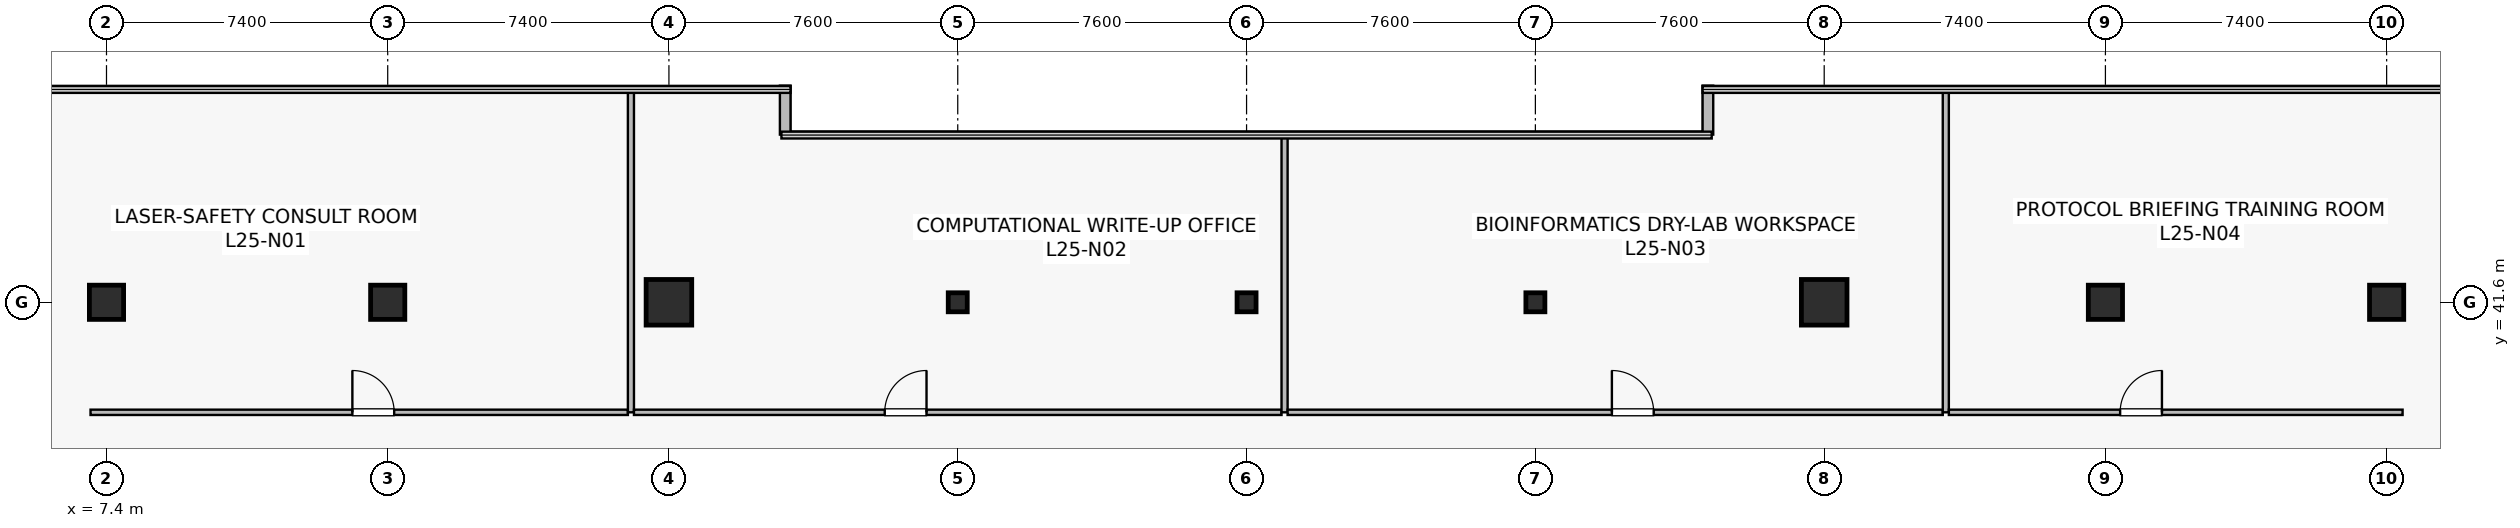
"""IFC4 building model, lengths in metres.
Left out: names, types, materials, properties, quantities, classifications, styles, units other than length and angle.
Written with IfcOpenShell. Run it as: python <this file> out.ifc"""

import sys

from ifc_helpers import new_model, si_unit, direction, frame, frame_2d, origin, origin_2d, place, context, subcontext, project, spatial, rectangle, hollow_rectangle, extrude, source, transform, mapped, element, fill, save


model = new_model("IFC4")
c1 = context("Model", 3, precision=1e-05, world=origin(), true_north=direction((0.0, 1.0)))
c2 = subcontext(c1, "Body", "Model", "MODEL_VIEW")
j1 = project(units=[si_unit("LENGTHUNIT", "METRE"), si_unit("PLANEANGLEUNIT", "RADIAN")], contexts=[c1])
p1 = place(None, origin())
s1 = spatial("IfcSite", under=j1, at=p1, CompositionType="ELEMENT")
p2 = place(p1, origin())
s2 = spatial("IfcBuilding", under=s1, at=p2, CompositionType="ELEMENT")
p3 = place(p2, frame((0.0, 0.0, 105.1)))
s3 = spatial("IfcBuildingStorey", under=s2, at=p3, CompositionType="ELEMENT", Elevation=105.1)
m1 = source(origin(), c2, "Body", "SweptSolid", [
    extrude(rectangle(XDim=0.9, YDim=0.9, at=origin_2d()), origin(), (0.0, 0.0, 1.0), 4.1),
])
p4 = place(p3, frame((14.8, 41.6, 0.0), z_axis=(0.0, 0.0, 1.0), x_axis=(1.0, 0.0, 0.0)))
e1 = element("IfcColumn", 1, at=p4, inside=s3, PredefinedType="COLUMN", context=c2, shape_type="MappedRepresentation", body=[
    mapped(m1, transform((0.0, 0.0, 0.0), scale=1.0)),
])
m2 = source(origin(), c2, "Body", "SweptSolid", [
    extrude(rectangle(XDim=1.2, YDim=1.2, at=origin_2d()), origin(), (0.0, 0.0, 1.0), 4.1),
])
for number, where, z_axis, x_axis in (
    (2, (22.2, 41.6, 0.0), (0.0, 0.0, 1.0), (1.0, 0.0, 0.0)),
    (3, (52.6, 41.6, 0.0), (0.0, 0.0, 1.0), (1.0, 0.0, 0.0)),
):
    element("IfcColumn", number, at=place(p3, frame(where, z_axis=z_axis, x_axis=x_axis)), inside=s3, PredefinedType="COLUMN", context=c2, shape_type="MappedRepresentation", body=[
        mapped(m2, transform((0.0, 0.0, 0.0), scale=1.0)),
    ])
for number, where, z_axis, x_axis in (
    (4, (60.0, 41.6, 0.0), (0.0, 0.0, 1.0), (1.0, 0.0, 0.0)),
    (5, (7.4, 41.6, 0.0), (0.0, 0.0, 1.0), (1.0, 0.0, 0.0)),
    (6, (67.4, 41.6, 0.0), (0.0, 0.0, 1.0), (1.0, 0.0, 0.0)),
):
    element("IfcColumn", number, at=place(p3, frame(where, z_axis=z_axis, x_axis=x_axis)), inside=s3, PredefinedType="COLUMN", context=c2, shape_type="MappedRepresentation", body=[
        mapped(m1, transform((0.0, 0.0, 0.0), scale=1.0)),
    ])
m3 = source(origin(), c2, "Body", "SweptSolid", [
    extrude(hollow_rectangle(XDim=0.5, YDim=0.5, WallThickness=0.022, at=origin_2d()), origin(), (0.0, 0.0, 1.0), 4.1),
])
for number, where, z_axis, x_axis in (
    (7, (29.8, 41.6, 0.0), (0.0, 0.0, 1.0), (1.0, 0.0, 0.0)),
    (8, (37.4, 41.6, 0.0), (0.0, 0.0, 1.0), (1.0, 0.0, 0.0)),
    (9, (45.0, 41.6, 0.0), (0.0, 0.0, 1.0), (1.0, 0.0, 0.0)),
):
    element("IfcColumn", number, at=place(p3, frame(where, z_axis=z_axis, x_axis=x_axis)), inside=s3, PredefinedType="COLUMN", context=c2, shape_type="MappedRepresentation", body=[
        mapped(m3, transform((0.0, 0.0, 0.0), scale=1.0)),
    ])
for number, where, z_axis, x_axis in (
    (10, (49.54, 47.3, 0.0), (0.0, 0.0, 1.0), (0.0, -1.0, 0.0)),
    (11, (25.26, 46.012, 0.0), (0.0, 0.0, 1.0), (0.0, 1.0, 0.0)),
):
    element("IfcWall", number, at=place(p3, frame(where, z_axis=z_axis, x_axis=x_axis)), inside=s3, PredefinedType="STANDARD", context=c2, shape_type="SweptSolid", body=[
        extrude(rectangle(XDim=1.288, YDim=0.28, at=frame_2d((0.644, 0.0))), origin(), (0.0, 0.0, 1.0), 3.79),
    ])
p5 = place(p3, frame((6.98, 38.705, 0.0), z_axis=(0.0, 0.0, 1.0), x_axis=(1.0, 0.0, 0.0)))
e12 = element("IfcWall", 12, at=p5, inside=s3, PredefinedType="PARTITIONING", context=c2, shape_type="SweptSolid", body=[
    extrude(rectangle(XDim=14.14, YDim=0.14, at=frame_2d((7.07, 0.0))), origin(), (0.0, 0.0, 1.0), 3.125),
])
p6 = place(p5, frame((6.89, 0.0, 0.0)))
e13 = element("IfcOpeningElement", 13, at=p6, cuts=e12, PredefinedType="OPENING", context=c2, shape_type="SweptSolid", body=[
    extrude(rectangle(XDim=1.1, YDim=2.18, at=frame_2d((0.55, 1.09))), frame((0.0, 0.08, 0.0), z_axis=(0.0, -1.0, 0.0), x_axis=(1.0, 0.0, 0.0)), (0.0, 0.0, 1.0), 0.16),
])
p7 = place(p3, frame((21.2, 38.705, 0.0), z_axis=(0.0, 0.0, 1.0), x_axis=(0.0, 1.0, 0.0)))
e14 = element("IfcWall", 14, at=p7, inside=s3, PredefinedType="PARTITIONING", context=c2, shape_type="SweptSolid", body=[
    extrude(rectangle(XDim=8.485, YDim=0.16, at=frame_2d((4.242, 0.0))), origin(), (0.0, 0.0, 1.0), 3.075),
])
p8 = place(p3, frame((21.28, 38.705, 0.0), z_axis=(0.0, 0.0, 1.0), x_axis=(1.0, 0.0, 0.0)))
e15 = element("IfcWall", 15, at=p8, inside=s3, PredefinedType="PARTITIONING", context=c2, shape_type="SweptSolid", body=[
    extrude(rectangle(XDim=17.04, YDim=0.14, at=frame_2d((8.52, 0.0))), origin(), (0.0, 0.0, 1.0), 3.125),
])
p9 = place(p8, frame((6.598, 0.0, 0.0)))
e16 = element("IfcOpeningElement", 16, at=p9, cuts=e15, PredefinedType="OPENING", context=c2, shape_type="SweptSolid", body=[
    extrude(rectangle(XDim=1.1, YDim=2.18, at=frame_2d((0.55, 1.09))), frame((0.0, 0.08, 0.0), z_axis=(0.0, -1.0, 0.0), x_axis=(1.0, 0.0, 0.0)), (0.0, 0.0, 1.0), 0.16),
])
p10 = place(p3, frame((38.4, 38.705, 0.0), z_axis=(0.0, 0.0, 1.0), x_axis=(0.0, 1.0, 0.0)))
e17 = element("IfcWall", 17, at=p10, inside=s3, PredefinedType="PARTITIONING", context=c2, shape_type="SweptSolid", body=[
    extrude(rectangle(XDim=7.285, YDim=0.16, at=frame_2d((3.643, 0.0))), origin(), (0.0, 0.0, 1.0), 3.075),
])
p11 = place(p3, frame((38.48, 38.705, 0.0), z_axis=(0.0, 0.0, 1.0), x_axis=(1.0, 0.0, 0.0)))
e18 = element("IfcWall", 18, at=p11, inside=s3, PredefinedType="PARTITIONING", context=c2, shape_type="SweptSolid", body=[
    extrude(rectangle(XDim=17.24, YDim=0.14, at=frame_2d((8.62, 0.0))), origin(), (0.0, 0.0, 1.0), 3.125),
])
p12 = place(p11, frame((8.533, 0.0, 0.0)))
e19 = element("IfcOpeningElement", 19, at=p12, cuts=e18, PredefinedType="OPENING", context=c2, shape_type="SweptSolid", body=[
    extrude(rectangle(XDim=1.1, YDim=2.18, at=frame_2d((0.55, 1.09))), frame((0.0, 0.08, 0.0), z_axis=(0.0, -1.0, 0.0), x_axis=(1.0, 0.0, 0.0)), (0.0, 0.0, 1.0), 0.16),
])
p13 = place(p3, frame((55.8, 38.705, 0.0), z_axis=(0.0, 0.0, 1.0), x_axis=(0.0, 1.0, 0.0)))
e20 = element("IfcWall", 20, at=p13, inside=s3, PredefinedType="PARTITIONING", context=c2, shape_type="SweptSolid", body=[
    extrude(rectangle(XDim=8.485, YDim=0.16, at=frame_2d((4.242, 0.0))), origin(), (0.0, 0.0, 1.0), 3.075),
])
p14 = place(p3, frame((55.88, 38.705, 0.0), z_axis=(0.0, 0.0, 1.0), x_axis=(1.0, 0.0, 0.0)))
e21 = element("IfcWall", 21, at=p14, inside=s3, PredefinedType="PARTITIONING", context=c2, shape_type="SweptSolid", body=[
    extrude(rectangle(XDim=11.94, YDim=0.14, at=frame_2d((5.97, 0.0))), origin(), (0.0, 0.0, 1.0), 3.125),
])
p15 = place(p14, frame((4.507, 0.0, 0.0)))
e22 = element("IfcOpeningElement", 22, at=p15, cuts=e21, PredefinedType="OPENING", context=c2, shape_type="SweptSolid", body=[
    extrude(rectangle(XDim=1.1, YDim=2.18, at=frame_2d((0.55, 1.09))), frame((0.0, 0.08, 0.0), z_axis=(0.0, -1.0, 0.0), x_axis=(1.0, 0.0, 0.0)), (0.0, 0.0, 1.0), 0.16),
])
m4 = source(origin(), c2, "Body", "SweptSolid", [
    extrude(rectangle(XDim=1.1, YDim=2.18, at=frame_2d((0.55, 1.09))), frame((0.0, 0.025, 0.0), z_axis=(0.0, -1.0, 0.0), x_axis=(1.0, 0.0, 0.0)), (0.0, 0.0, 1.0), 0.05),
])
p16 = place(p6, origin())
e23 = element("IfcDoor", 23, at=p16, inside=s3, OperationType="SINGLE_SWING_LEFT", PredefinedType="DOOR", context=c2, shape_type="MappedRepresentation", body=[
    mapped(m4, transform((0.0, 0.0, 0.0), scale=1.0)),
])
fill(e13, e23)
p17 = place(p9, origin())
e24 = element("IfcDoor", 24, at=p17, inside=s3, OperationType="SINGLE_SWING_RIGHT", PredefinedType="DOOR", context=c2, shape_type="MappedRepresentation", body=[
    mapped(m4, transform((0.0, 0.0, 0.0), scale=1.0)),
])
fill(e16, e24)
p18 = place(p12, origin())
e25 = element("IfcDoor", 25, at=p18, inside=s3, OperationType="SINGLE_SWING_LEFT", PredefinedType="DOOR", context=c2, shape_type="MappedRepresentation", body=[
    mapped(m4, transform((0.0, 0.0, 0.0), scale=1.0)),
])
fill(e19, e25)
p19 = place(p15, origin())
e26 = element("IfcDoor", 26, at=p19, inside=s3, OperationType="SINGLE_SWING_RIGHT", PredefinedType="DOOR", context=c2, shape_type="MappedRepresentation", body=[
    mapped(m4, transform((0.0, 0.0, 0.0), scale=1.0)),
])
fill(e22, e26)
save(model, sys.argv[1])
